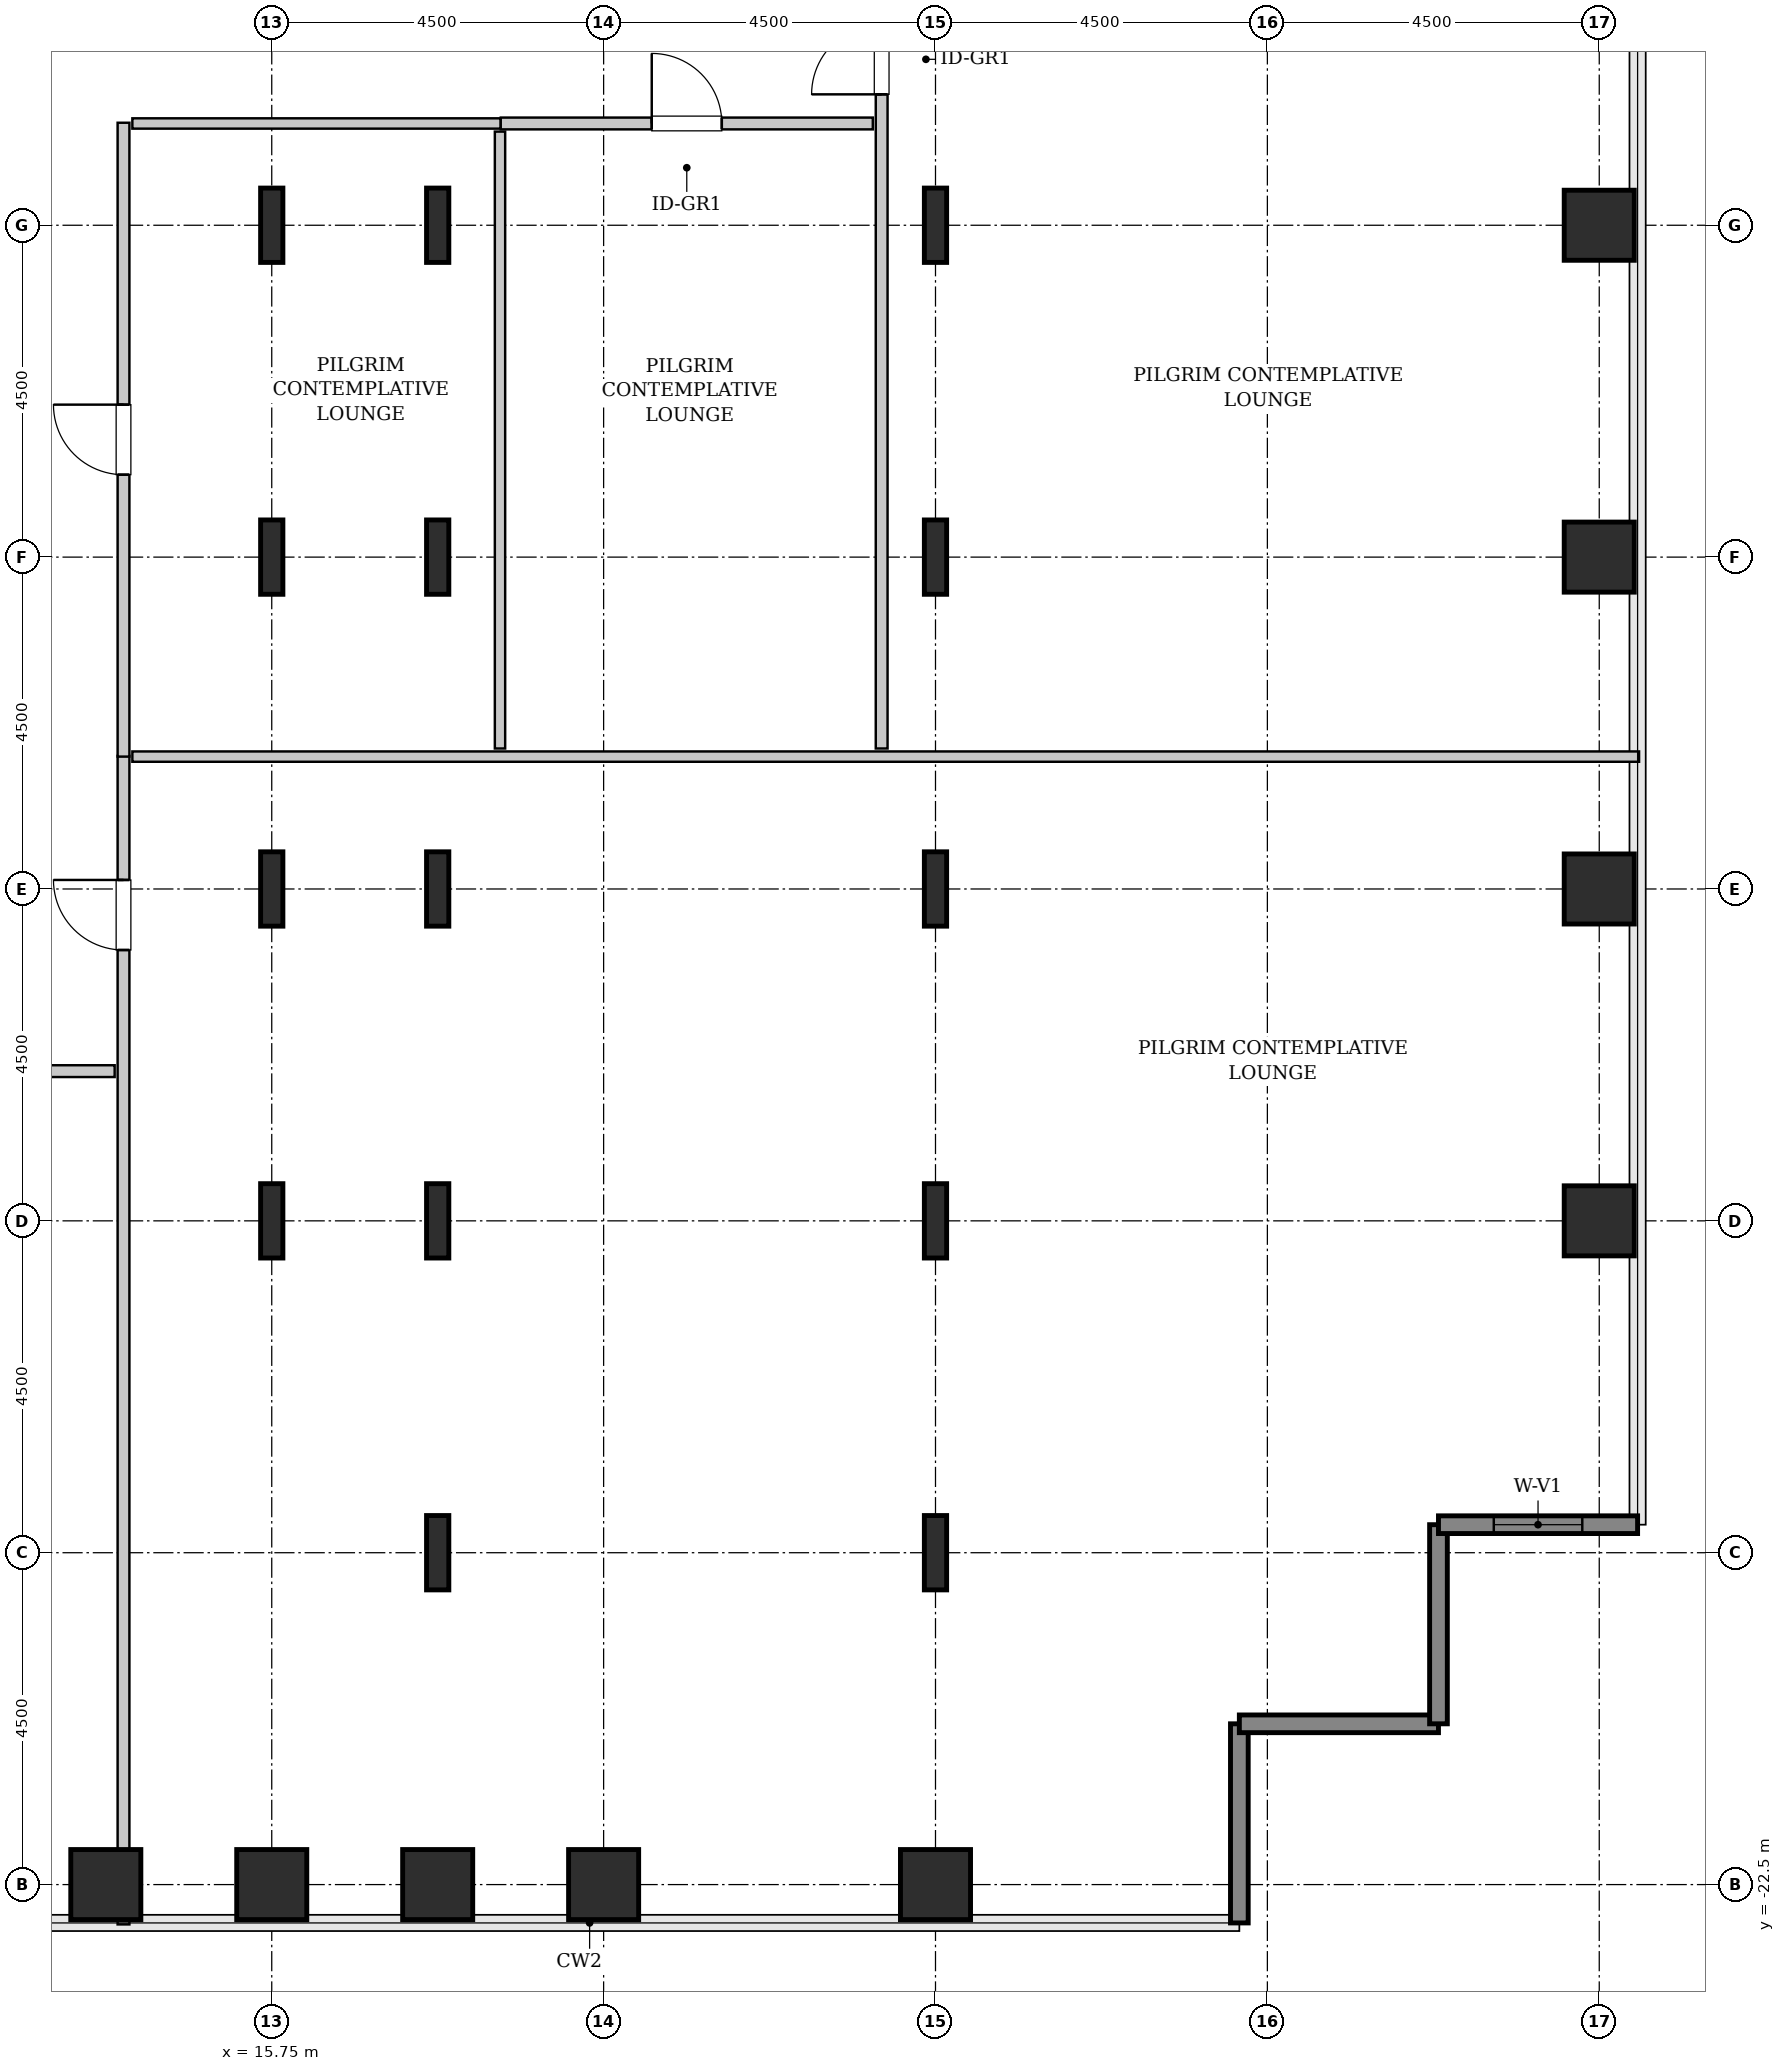
"""IFC4 building model, lengths in metres.
Left out: names, types, materials, properties, quantities, classifications, styles, units other than length and angle.
Written with IfcOpenShell. Run it as: python <this file> out.ifc"""

import sys

from ifc_helpers import new_model, si_unit, direction, frame, frame_2d, origin, origin_2d, place, context, subcontext, project, spatial, rectangle, hollow_rectangle, i_section, extrude, source, transform, mapped, element, fill, save


model = new_model("IFC4")
c1 = context("Model", 3, precision=1e-05, world=origin(), true_north=direction((0.0, 1.0)))
c2 = subcontext(c1, "Body", "Model", "MODEL_VIEW")
j1 = project(units=[si_unit("LENGTHUNIT", "METRE"), si_unit("PLANEANGLEUNIT", "RADIAN")], contexts=[c1])
p1 = place(None, origin())
s1 = spatial("IfcSite", under=j1, at=p1, CompositionType="ELEMENT")
p2 = place(p1, origin())
s2 = spatial("IfcBuilding", under=s1, at=p2, CompositionType="ELEMENT")
p3 = place(p2, frame((0.0, 0.0, 52.0)))
s3 = spatial("IfcBuildingStorey", under=s2, at=p3, CompositionType="ELEMENT", Elevation=52.0)
m1 = source(origin(), c2, "Body", "SweptSolid", [
    extrude(hollow_rectangle(XDim=0.95, YDim=0.95, WallThickness=0.045, InnerFilletRadius=0.045, OuterFilletRadius=0.09, at=origin_2d()), origin(), (0.0, 0.0, 1.0), 3.8),
])
for number, where, z_axis, x_axis in (
    (1, (13.5, -22.5, 0.0), (0.0, 0.0, 1.0), (1.0, 0.0, 0.0)),
    (2, (15.75, -22.5, 0.0), (0.0, 0.0, 1.0), (1.0, 0.0, 0.0)),
):
    element("IfcColumn", number, at=place(p3, frame(where, z_axis=z_axis, x_axis=x_axis)), inside=s3, PredefinedType="COLUMN", context=c2, shape_type="MappedRepresentation", body=[
        mapped(m1, transform((0.0, 0.0, 0.0), x_axis=(1.0, 0.0, 0.0), y_axis=(0.0, 1.0, 0.0), z_axis=(0.0, 0.0, 1.0), scale=1.0)),
    ])
m2 = source(origin(), c2, "Body", "SweptSolid", [
    extrude(i_section(OverallWidth=0.302, OverallDepth=1.008, WebThickness=0.021, FlangeThickness=0.04, FilletRadius=0.03, at=origin_2d()), origin(), (0.0, 0.0, 1.0), 3.8),
])
for number, where, z_axis, x_axis in (
    (3, (15.75, -13.5, 0.0), (0.0, 0.0, 1.0), (1.0, 0.0, 0.0)),
    (4, (15.75, -9.0, 0.0), (0.0, 0.0, 1.0), (1.0, 0.0, 0.0)),
    (5, (15.75, -4.5, 0.0), (0.0, 0.0, 1.0), (1.0, 0.0, 0.0)),
    (6, (15.75, 0.0, 0.0), (0.0, 0.0, 1.0), (1.0, 0.0, 0.0)),
):
    element("IfcColumn", number, at=place(p3, frame(where, z_axis=z_axis, x_axis=x_axis)), inside=s3, PredefinedType="COLUMN", context=c2, shape_type="MappedRepresentation", body=[
        mapped(m2, transform((0.0, 0.0, 0.0), x_axis=(1.0, 0.0, 0.0), y_axis=(0.0, 1.0, 0.0), z_axis=(0.0, 0.0, 1.0), scale=1.0)),
    ])
p4 = place(p3, frame((18.0, -22.5, 0.0), z_axis=(0.0, 0.0, 1.0), x_axis=(1.0, 0.0, 0.0)))
e7 = element("IfcColumn", 7, at=p4, inside=s3, PredefinedType="COLUMN", context=c2, shape_type="MappedRepresentation", body=[
    mapped(m1, transform((0.0, 0.0, 0.0), x_axis=(1.0, 0.0, 0.0), y_axis=(0.0, 1.0, 0.0), z_axis=(0.0, 0.0, 1.0), scale=1.0)),
])
for number, where, z_axis, x_axis in (
    (8, (18.0, -18.0, 0.0), (0.0, 0.0, 1.0), (1.0, 0.0, 0.0)),
    (9, (18.0, -13.5, 0.0), (0.0, 0.0, 1.0), (1.0, 0.0, 0.0)),
    (10, (18.0, -9.0, 0.0), (0.0, 0.0, 1.0), (1.0, 0.0, 0.0)),
    (11, (18.0, -4.5, 0.0), (0.0, 0.0, 1.0), (1.0, 0.0, 0.0)),
    (12, (18.0, 0.0, 0.0), (0.0, 0.0, 1.0), (1.0, 0.0, 0.0)),
):
    element("IfcColumn", number, at=place(p3, frame(where, z_axis=z_axis, x_axis=x_axis)), inside=s3, PredefinedType="COLUMN", context=c2, shape_type="MappedRepresentation", body=[
        mapped(m2, transform((0.0, 0.0, 0.0), x_axis=(1.0, 0.0, 0.0), y_axis=(0.0, 1.0, 0.0), z_axis=(0.0, 0.0, 1.0), scale=1.0)),
    ])
for number, where, z_axis, x_axis in (
    (13, (20.25, -22.5, 0.0), (0.0, 0.0, 1.0), (1.0, 0.0, 0.0)),
    (14, (24.75, -22.5, 0.0), (0.0, 0.0, 1.0), (1.0, 0.0, 0.0)),
):
    element("IfcColumn", number, at=place(p3, frame(where, z_axis=z_axis, x_axis=x_axis)), inside=s3, PredefinedType="COLUMN", context=c2, shape_type="MappedRepresentation", body=[
        mapped(m1, transform((0.0, 0.0, 0.0), x_axis=(1.0, 0.0, 0.0), y_axis=(0.0, 1.0, 0.0), z_axis=(0.0, 0.0, 1.0), scale=1.0)),
    ])
for number, where, z_axis, x_axis in (
    (15, (24.75, -18.0, 0.0), (0.0, 0.0, 1.0), (1.0, 0.0, 0.0)),
    (16, (24.75, -13.5, 0.0), (0.0, 0.0, 1.0), (1.0, 0.0, 0.0)),
    (17, (24.75, -9.0, 0.0), (0.0, 0.0, 1.0), (1.0, 0.0, 0.0)),
    (18, (24.75, -4.5, 0.0), (0.0, 0.0, 1.0), (1.0, 0.0, 0.0)),
    (19, (24.75, 0.0, 0.0), (0.0, 0.0, 1.0), (1.0, 0.0, 0.0)),
):
    element("IfcColumn", number, at=place(p3, frame(where, z_axis=z_axis, x_axis=x_axis)), inside=s3, PredefinedType="COLUMN", context=c2, shape_type="MappedRepresentation", body=[
        mapped(m2, transform((0.0, 0.0, 0.0), x_axis=(1.0, 0.0, 0.0), y_axis=(0.0, 1.0, 0.0), z_axis=(0.0, 0.0, 1.0), scale=1.0)),
    ])
for number, where, z_axis, x_axis in (
    (20, (33.75, -13.5, 0.0), (0.0, 0.0, 1.0), (1.0, 0.0, 0.0)),
    (21, (33.75, -9.0, 0.0), (0.0, 0.0, 1.0), (1.0, 0.0, 0.0)),
    (22, (33.75, -4.5, 0.0), (0.0, 0.0, 1.0), (1.0, 0.0, 0.0)),
    (23, (33.75, 0.0, 0.0), (0.0, 0.0, 1.0), (1.0, 0.0, 0.0)),
):
    element("IfcColumn", number, at=place(p3, frame(where, z_axis=z_axis, x_axis=x_axis)), inside=s3, PredefinedType="COLUMN", context=c2, shape_type="MappedRepresentation", body=[
        mapped(m1, transform((0.0, 0.0, 0.0), x_axis=(1.0, 0.0, 0.0), y_axis=(0.0, 1.0, 0.0), z_axis=(0.0, 0.0, 1.0), scale=1.0)),
    ])
m3 = source(origin(), c2, "Body", "SweptSolid", [
    extrude(rectangle(XDim=2.7, YDim=0.24, at=frame_2d((1.35, 0.0))), origin(), (0.0, 0.0, 1.0), 3.55),
])
for number, where, z_axis, x_axis in (
    (24, (28.87, -23.02, 0.0), (0.0, 0.0, 1.0), (0.0, 1.0, 0.0)),
    (25, (28.87, -20.32, 0.0), (0.0, 0.0, 1.0), (1.0, 0.0, 0.0)),
    (26, (31.57, -20.32, 0.0), (0.0, 0.0, 1.0), (0.0, 1.0, 0.0)),
):
    element("IfcWall", number, at=place(p3, frame(where, z_axis=z_axis, x_axis=x_axis)), inside=s3, PredefinedType="SHEAR", context=c2, shape_type="MappedRepresentation", body=[
        mapped(m3, transform((0.0, 0.0, 0.0), x_axis=(1.0, 0.0, 0.0), y_axis=(0.0, 1.0, 0.0), z_axis=(0.0, 0.0, 1.0), scale=1.0)),
    ])
p5 = place(p3, frame((31.57, -17.62, 0.0), z_axis=(0.0, 0.0, 1.0), x_axis=(1.0, 0.0, 0.0)))
e27 = element("IfcWall", 27, at=p5, inside=s3, PredefinedType="SHEAR", context=c2, shape_type="MappedRepresentation", body=[
    mapped(m3, transform((0.0, 0.0, 0.0), x_axis=(1.0, 0.0, 0.0), y_axis=(0.0, 1.0, 0.0), z_axis=(0.0, 0.0, 1.0), scale=1.0)),
])
p6 = place(p5, frame((0.75, 0.0, 0.85)))
e28 = element("IfcOpeningElement", 28, at=p6, cuts=e27, PredefinedType="OPENING", context=c2, shape_type="SweptSolid", body=[
    extrude(rectangle(XDim=1.2, YDim=1.8, at=frame_2d((0.6, 0.9))), frame((0.0, 0.13, 0.0), z_axis=(0.0, -1.0, 0.0), x_axis=(1.0, 0.0, 0.0)), (0.0, 0.0, 1.0), 0.26),
])
m4 = source(origin(), c2, "Body", "SweptSolid", [
    extrude(rectangle(XDim=15.845, YDim=0.16, at=frame_2d((7.922, 0.0))), origin(), (0.0, 0.0, 1.0), 3.535),
])
p7 = place(p3, frame((13.74, -23.04, 0.0), z_axis=(0.0, 0.0, 1.0), x_axis=(0.0, 1.0, 0.0)))
e29 = element("IfcWall", 29, at=p7, inside=s3, PredefinedType="PARTITIONING", context=c2, shape_type="MappedRepresentation", body=[
    mapped(m4, transform((0.0, 0.0, 0.0), x_axis=(1.0, 0.0, 0.0), y_axis=(0.0, 1.0, 0.0), z_axis=(0.0, 0.0, 1.0), scale=1.0)),
])
p8 = place(p7, frame((13.212, 0.0, 0.0)))
e30 = element("IfcOpeningElement", 30, at=p8, cuts=e29, PredefinedType="OPENING", context=c2, shape_type="SweptSolid", body=[
    extrude(rectangle(XDim=0.95, YDim=2.1, at=frame_2d((0.475, 1.05))), frame((0.0, 0.09, 0.0), z_axis=(0.0, -1.0, 0.0), x_axis=(1.0, 0.0, 0.0)), (0.0, 0.0, 1.0), 0.18),
])
m5 = source(origin(), c2, "Body", "SweptSolid", [
    extrude(rectangle(XDim=20.43, YDim=0.14, at=frame_2d((10.215, 0.0))), origin(), (0.0, 0.0, 1.0), 3.535),
])
p9 = place(p3, frame((13.86, -7.205, 0.0), z_axis=(0.0, 0.0, 1.0), x_axis=(1.0, 0.0, 0.0)))
e31 = element("IfcWall", 31, at=p9, inside=s3, PredefinedType="PARTITIONING", context=c2, shape_type="MappedRepresentation", body=[
    mapped(m5, transform((0.0, 0.0, 0.0), x_axis=(1.0, 0.0, 0.0), y_axis=(0.0, 1.0, 0.0), z_axis=(0.0, 0.0, 1.0), scale=1.0)),
])
m6 = source(origin(), c2, "Body", "SweptSolid", [
    extrude(rectangle(XDim=13.3, YDim=0.16, at=frame_2d((6.65, 0.0))), origin(), (0.0, 0.0, 1.0), 3.535),
])
p10 = place(p3, frame((24.02, -7.095, 0.0), z_axis=(0.0, 0.0, 1.0), x_axis=(0.0, 1.0, 0.0)))
e32 = element("IfcWall", 32, at=p10, inside=s3, PredefinedType="PARTITIONING", context=c2, shape_type="MappedRepresentation", body=[
    mapped(m6, transform((0.0, 0.0, 0.0), x_axis=(1.0, 0.0, 0.0), y_axis=(0.0, 1.0, 0.0), z_axis=(0.0, 0.0, 1.0), scale=1.0)),
])
p11 = place(p10, frame((8.87, 0.0, 0.0)))
e33 = element("IfcOpeningElement", 33, at=p11, cuts=e32, PredefinedType="OPENING", context=c2, shape_type="SweptSolid", body=[
    extrude(rectangle(XDim=0.95, YDim=2.1, at=frame_2d((0.475, 1.05))), frame((0.0, 0.09, 0.0), z_axis=(0.0, -1.0, 0.0), x_axis=(1.0, 0.0, 0.0)), (0.0, 0.0, 1.0), 0.18),
])
m7 = source(origin(), c2, "Body", "SweptSolid", [
    extrude(rectangle(XDim=8.595, YDim=0.16, at=frame_2d((4.297, 0.0))), origin(), (0.0, 0.0, 1.0), 3.535),
])
p12 = place(p3, frame((13.74, -7.205, 0.0), z_axis=(0.0, 0.0, 1.0), x_axis=(0.0, 1.0, 0.0)))
e34 = element("IfcWall", 34, at=p12, inside=s3, PredefinedType="PARTITIONING", context=c2, shape_type="MappedRepresentation", body=[
    mapped(m7, transform((0.0, 0.0, 0.0), x_axis=(1.0, 0.0, 0.0), y_axis=(0.0, 1.0, 0.0), z_axis=(0.0, 0.0, 1.0), scale=1.0)),
])
p13 = place(p12, frame((3.823, 0.0, 0.0)))
e35 = element("IfcOpeningElement", 35, at=p13, cuts=e34, PredefinedType="OPENING", context=c2, shape_type="SweptSolid", body=[
    extrude(rectangle(XDim=0.95, YDim=2.1, at=frame_2d((0.475, 1.05))), frame((0.0, 0.09, 0.0), z_axis=(0.0, -1.0, 0.0), x_axis=(1.0, 0.0, 0.0)), (0.0, 0.0, 1.0), 0.18),
])
m8 = source(origin(), c2, "Body", "SweptSolid", [
    extrude(rectangle(XDim=4.995, YDim=0.14, at=frame_2d((2.498, 0.0))), origin(), (0.0, 0.0, 1.0), 3.535),
])
p14 = place(p3, frame((13.86, 1.38, 0.0), z_axis=(0.0, 0.0, 1.0), x_axis=(1.0, 0.0, 0.0)))
e36 = element("IfcWall", 36, at=p14, inside=s3, PredefinedType="PARTITIONING", context=c2, shape_type="MappedRepresentation", body=[
    mapped(m8, transform((0.0, 0.0, 0.0), x_axis=(1.0, 0.0, 0.0), y_axis=(0.0, 1.0, 0.0), z_axis=(0.0, 0.0, 1.0), scale=1.0)),
])
m9 = source(origin(), c2, "Body", "SweptSolid", [
    extrude(rectangle(XDim=8.365, YDim=0.14, at=frame_2d((4.183, 0.0))), origin(), (0.0, 0.0, 1.0), 3.535),
])
p15 = place(p3, frame((18.845, -7.095, 0.0), z_axis=(0.0, 0.0, 1.0), x_axis=(0.0, 1.0, 0.0)))
e37 = element("IfcWall", 37, at=p15, inside=s3, PredefinedType="PARTITIONING", context=c2, shape_type="MappedRepresentation", body=[
    mapped(m9, transform((0.0, 0.0, 0.0), x_axis=(1.0, 0.0, 0.0), y_axis=(0.0, 1.0, 0.0), z_axis=(0.0, 0.0, 1.0), scale=1.0)),
])
m10 = source(origin(), c2, "Body", "SweptSolid", [
    extrude(rectangle(XDim=5.045, YDim=0.16, at=frame_2d((2.522, 0.0))), origin(), (0.0, 0.0, 1.0), 3.535),
])
p16 = place(p3, frame((18.855, 1.38, 0.0), z_axis=(0.0, 0.0, 1.0), x_axis=(1.0, 0.0, 0.0)))
e38 = element("IfcWall", 38, at=p16, inside=s3, PredefinedType="PARTITIONING", context=c2, shape_type="MappedRepresentation", body=[
    mapped(m10, transform((0.0, 0.0, 0.0), x_axis=(1.0, 0.0, 0.0), y_axis=(0.0, 1.0, 0.0), z_axis=(0.0, 0.0, 1.0), scale=1.0)),
])
p17 = place(p16, frame((2.048, 0.0, 0.0)))
e39 = element("IfcOpeningElement", 39, at=p17, cuts=e38, PredefinedType="OPENING", context=c2, shape_type="SweptSolid", body=[
    extrude(rectangle(XDim=0.95, YDim=2.1, at=frame_2d((0.475, 1.05))), frame((0.0, 0.09, 0.0), z_axis=(0.0, -1.0, 0.0), x_axis=(1.0, 0.0, 0.0)), (0.0, 0.0, 1.0), 0.18),
])
m11 = source(origin(), c2, "Body", "SweptSolid", [
    extrude(rectangle(XDim=6.025, YDim=0.16, at=frame_2d((3.013, 0.0))), origin(), (0.0, 0.0, 1.0), 3.535),
])
p18 = place(p3, frame((7.595, -11.47, 0.0), z_axis=(0.0, 0.0, 1.0), x_axis=(1.0, 0.0, 0.0)))
e40 = element("IfcWall", 40, at=p18, inside=s3, PredefinedType="PARTITIONING", context=c2, shape_type="MappedRepresentation", body=[
    mapped(m11, transform((0.0, 0.0, 0.0), x_axis=(1.0, 0.0, 0.0), y_axis=(0.0, 1.0, 0.0), z_axis=(0.0, 0.0, 1.0), scale=1.0)),
])
p19 = place(p18, frame((2.538, 0.0, 0.0)))
e41 = element("IfcOpeningElement", 41, at=p19, cuts=e40, PredefinedType="OPENING", context=c2, shape_type="SweptSolid", body=[
    extrude(rectangle(XDim=0.95, YDim=2.1, at=frame_2d((0.475, 1.05))), frame((0.0, 0.09, 0.0), z_axis=(0.0, -1.0, 0.0), x_axis=(1.0, 0.0, 0.0)), (0.0, 0.0, 1.0), 0.18),
])
m12 = source(origin(), c2, "Body", "SweptSolid", [
    extrude(rectangle(XDim=1.2, YDim=1.8, at=frame_2d((0.6, 0.9))), frame((0.0, 0.03, 0.0), z_axis=(0.0, -1.0, 0.0), x_axis=(1.0, 0.0, 0.0)), (0.0, 0.0, 1.0), 0.06),
])
p20 = place(p6, origin())
e42 = element("IfcWindow", 42, at=p20, inside=s3, PartitioningType="SINGLE_PANEL", PredefinedType="WINDOW", context=c2, shape_type="MappedRepresentation", body=[
    mapped(m12, transform((0.0, 0.0, 0.0), x_axis=(1.0, 0.0, 0.0), y_axis=(0.0, 1.0, 0.0), z_axis=(0.0, 0.0, 1.0), scale=1.0)),
])
fill(e28, e42)
m13 = source(origin(), c2, "Body", "SweptSolid", [
    extrude(rectangle(XDim=0.95, YDim=2.1, at=frame_2d((0.475, 1.05))), frame((0.0, 0.025, 0.0), z_axis=(0.0, -1.0, 0.0), x_axis=(1.0, 0.0, 0.0)), (0.0, 0.0, 1.0), 0.05),
])
p21 = place(p8, origin())
e43 = element("IfcDoor", 43, at=p21, inside=s3, OperationType="SINGLE_SWING_RIGHT", PredefinedType="DOOR", context=c2, shape_type="MappedRepresentation", body=[
    mapped(m13, transform((0.0, 0.0, 0.0), x_axis=(1.0, 0.0, 0.0), y_axis=(0.0, 1.0, 0.0), z_axis=(0.0, 0.0, 1.0), scale=1.0)),
])
fill(e30, e43)
p22 = place(p11, origin())
e44 = element("IfcDoor", 44, at=p22, inside=s3, OperationType="SINGLE_SWING_LEFT", PredefinedType="DOOR", context=c2, shape_type="MappedRepresentation", body=[
    mapped(m13, transform((0.0, 0.0, 0.0), x_axis=(1.0, 0.0, 0.0), y_axis=(0.0, 1.0, 0.0), z_axis=(0.0, 0.0, 1.0), scale=1.0)),
])
fill(e33, e44)
p23 = place(p13, origin())
e45 = element("IfcDoor", 45, at=p23, inside=s3, OperationType="SINGLE_SWING_RIGHT", PredefinedType="DOOR", context=c2, shape_type="MappedRepresentation", body=[
    mapped(m13, transform((0.0, 0.0, 0.0), x_axis=(1.0, 0.0, 0.0), y_axis=(0.0, 1.0, 0.0), z_axis=(0.0, 0.0, 1.0), scale=1.0)),
])
fill(e35, e45)
p24 = place(p17, origin())
e46 = element("IfcDoor", 46, at=p24, inside=s3, OperationType="SINGLE_SWING_LEFT", PredefinedType="DOOR", context=c2, shape_type="MappedRepresentation", body=[
    mapped(m13, transform((0.0, 0.0, 0.0), x_axis=(1.0, 0.0, 0.0), y_axis=(0.0, 1.0, 0.0), z_axis=(0.0, 0.0, 1.0), scale=1.0)),
])
fill(e39, e46)
save(model, sys.argv[1])
